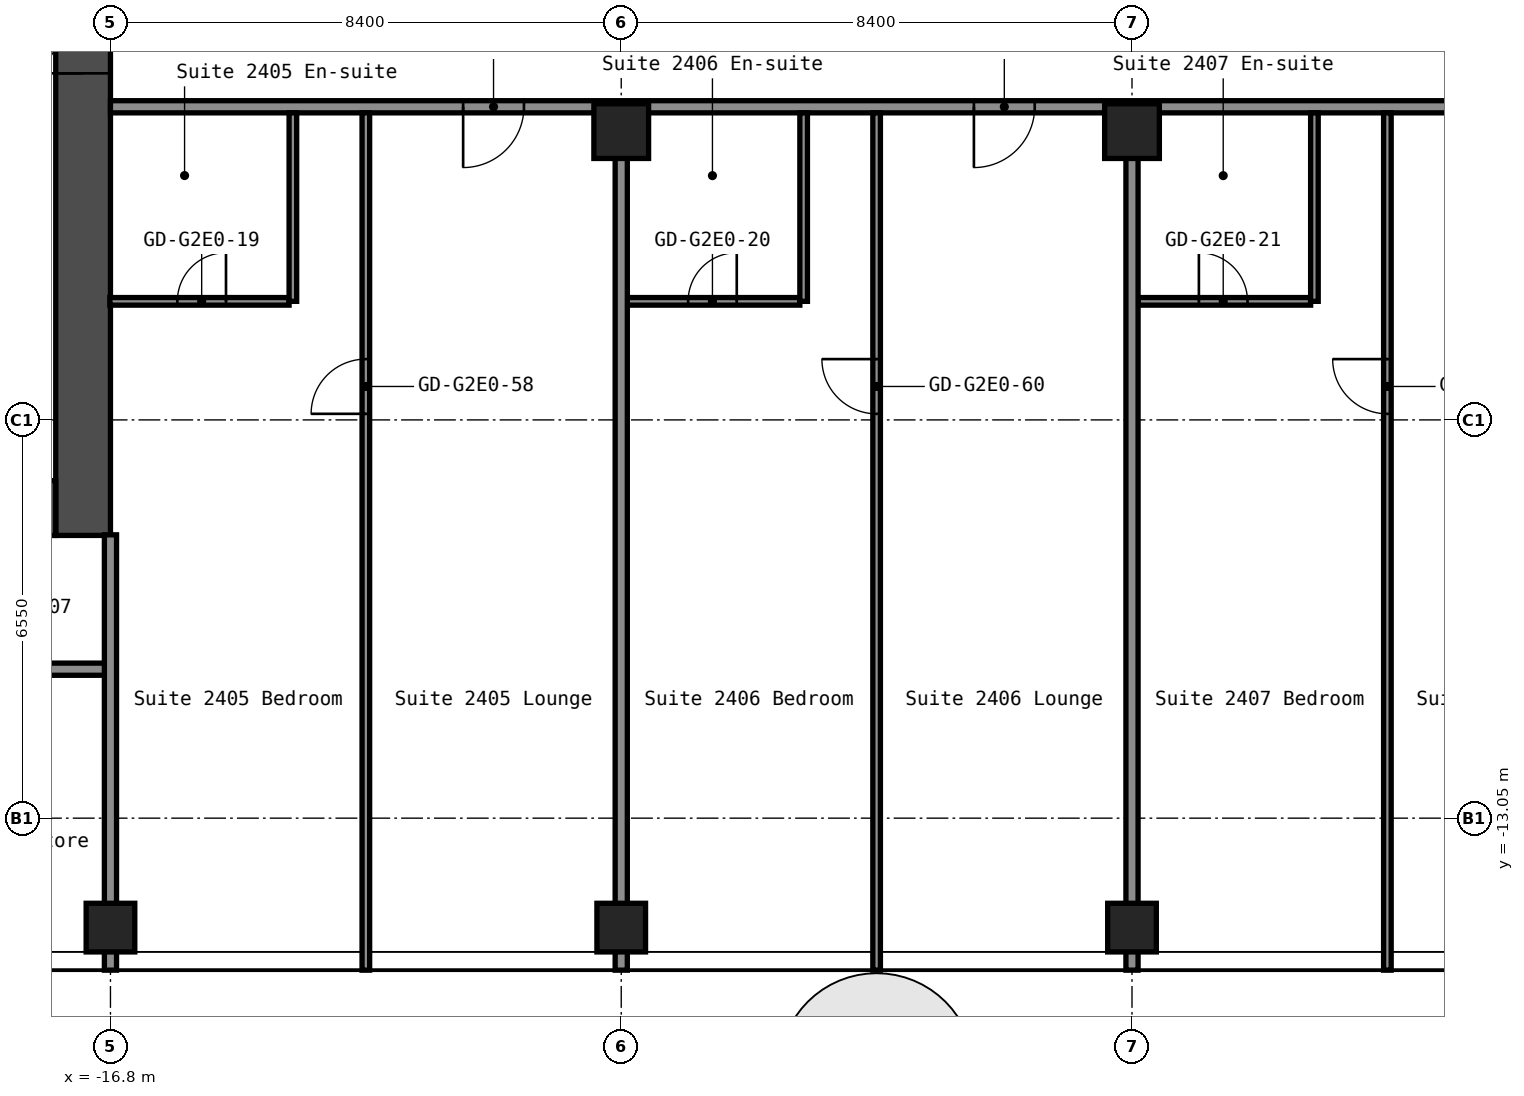
"""IFC4 building model, lengths in metres.
Left out: names, types, materials, properties, quantities, classifications, styles, units other than length and angle.
Written with IfcOpenShell. Run it as: python <this file> out.ifc"""

import sys

from ifc_helpers import new_model, si_unit, direction, frame, frame_2d, origin, origin_2d, place, context, subcontext, project, spatial, rectangle, hollow_rectangle, extrude, element, fill, save


model = new_model("IFC4")
c1 = context("Model", 3, precision=1e-05, world=origin(), true_north=direction((0.0, 1.0)))
c2 = subcontext(c1, "Body", "Model", "MODEL_VIEW")
j1 = project(units=[si_unit("LENGTHUNIT", "METRE"), si_unit("PLANEANGLEUNIT", "RADIAN")], contexts=[c1])
p1 = place(None, origin())
s1 = spatial("IfcSite", under=j1, at=p1, CompositionType="ELEMENT")
p2 = place(p1, origin())
s2 = spatial("IfcBuilding", under=s1, at=p2, CompositionType="ELEMENT")
p3 = place(p2, frame((0.0, 0.0, 88.2)))
s3 = spatial("IfcBuildingStorey", under=s2, at=p3, CompositionType="ELEMENT", Elevation=88.2)
for number, where, z_axis, x_axis in (
    (1, (-16.8, -14.85, 0.0), (0.0, 0.0, 1.0), (1.0, 0.0, 0.0)),
    (2, (-8.4, -14.85, 0.0), (0.0, 0.0, 1.0), (1.0, 0.0, 0.0)),
):
    element("IfcColumn", number, at=place(p3, frame(where, z_axis=z_axis, x_axis=x_axis)), inside=s3, PredefinedType="COLUMN", context=c2, shape_type="SweptSolid", body=[
        extrude(hollow_rectangle(XDim=0.8, YDim=0.8, WallThickness=0.032, at=origin_2d()), origin(), (0.0, 0.0, 1.0), 2.8),
    ])
p4 = place(p3, frame((-8.4, -1.75, 0.0), z_axis=(0.0, 0.0, 1.0), x_axis=(1.0, 0.0, 0.0)))
e3 = element("IfcColumn", 3, at=p4, inside=s3, PredefinedType="COLUMN", context=c2, shape_type="SweptSolid", body=[
    extrude(hollow_rectangle(XDim=0.9, YDim=0.9, WallThickness=0.036, at=origin_2d()), origin(), (0.0, 0.0, 1.0), 2.8),
])
p5 = place(p3, frame((0.0, -14.85, 0.0), z_axis=(0.0, 0.0, 1.0), x_axis=(1.0, 0.0, 0.0)))
e4 = element("IfcColumn", 4, at=p5, inside=s3, PredefinedType="COLUMN", context=c2, shape_type="SweptSolid", body=[
    extrude(hollow_rectangle(XDim=0.8, YDim=0.8, WallThickness=0.032, at=origin_2d()), origin(), (0.0, 0.0, 1.0), 2.8),
])
p6 = place(p3, frame((0.0, -1.75, 0.0), z_axis=(0.0, 0.0, 1.0), x_axis=(1.0, 0.0, 0.0)))
e5 = element("IfcColumn", 5, at=p6, inside=s3, PredefinedType="COLUMN", context=c2, shape_type="SweptSolid", body=[
    extrude(hollow_rectangle(XDim=0.9, YDim=0.9, WallThickness=0.036, at=origin_2d()), origin(), (0.0, 0.0, 1.0), 2.8),
])
p7 = place(p3, frame((-17.25, -8.4, 0.0), z_axis=(0.0, 0.0, 1.0), x_axis=(0.0, 1.0, 0.0)))
e6 = element("IfcWall", 6, at=p7, inside=s3, PredefinedType="SHEAR", context=c2, shape_type="SweptSolid", body=[
    extrude(rectangle(XDim=16.8, YDim=0.9, at=frame_2d((8.4, 0.0))), origin(), (0.0, 0.0, 1.0), 2.8),
])
p8 = place(p7, frame((7.6, 0.0, 0.0)))
e7 = element("IfcOpeningElement", 7, at=p8, cuts=e6, PredefinedType="OPENING", context=c2, shape_type="SweptSolid", body=[
    extrude(rectangle(XDim=1.2, YDim=2.1, at=frame_2d((0.6, 1.05))), frame((0.0, 0.46, 0.0), z_axis=(0.0, -1.0, 0.0), x_axis=(1.0, 0.0, 0.0)), (0.0, 0.0, 1.0), 0.92),
])
p9 = place(p3, frame((-32.7, -7.95, 0.0), z_axis=(0.0, 0.0, 1.0), x_axis=(1.0, 0.0, 0.0)))
e8 = element("IfcWall", 8, at=p9, inside=s3, PredefinedType="SHEAR", context=c2, shape_type="SweptSolid", body=[
    extrude(rectangle(XDim=15.0, YDim=0.9, at=frame_2d((7.5, 0.0))), origin(), (0.0, 0.0, 1.0), 2.8),
])
p10 = place(p9, frame((11.45, 0.0, 0.0)))
e9 = element("IfcOpeningElement", 9, at=p10, cuts=e8, PredefinedType="OPENING", context=c2, shape_type="SweptSolid", body=[
    extrude(rectangle(XDim=1.0, YDim=2.1, at=frame_2d((0.5, 1.05))), frame((0.0, 0.46, 0.0), z_axis=(0.0, -1.0, 0.0), x_axis=(1.0, 0.0, 0.0)), (0.0, 0.0, 1.0), 0.92),
])
p11 = place(p3, frame((-46.5, -10.6, 0.0), z_axis=(0.0, 0.0, 1.0), x_axis=(1.0, 0.0, 0.0)))
e10 = element("IfcWall", 10, at=p11, inside=s3, PredefinedType="PARTITIONING", context=c2, shape_type="SweptSolid", body=[
    extrude(rectangle(XDim=29.7, YDim=0.2, at=frame_2d((14.85, 0.0))), origin(), (0.0, 0.0, 1.0), 2.8),
])
p12 = place(p11, frame((1.95, 0.0, 0.0)))
e11 = element("IfcOpeningElement", 11, at=p12, cuts=e10, PredefinedType="OPENING", context=c2, shape_type="SweptSolid", body=[
    extrude(rectangle(XDim=0.9, YDim=2.1, at=frame_2d((0.45, 1.05))), frame((0.0, 0.11, 0.0), z_axis=(0.0, -1.0, 0.0), x_axis=(1.0, 0.0, 0.0)), (0.0, 0.0, 1.0), 0.22),
])
p13 = place(p11, frame((6.485, 0.0, 0.0)))
e12 = element("IfcOpeningElement", 12, at=p13, cuts=e10, PredefinedType="OPENING", context=c2, shape_type="SweptSolid", body=[
    extrude(rectangle(XDim=0.9, YDim=2.1, at=frame_2d((0.45, 1.05))), frame((0.0, 0.11, 0.0), z_axis=(0.0, -1.0, 0.0), x_axis=(1.0, 0.0, 0.0)), (0.0, 0.0, 1.0), 0.22),
])
p14 = place(p11, frame((10.685, 0.0, 0.0)))
e13 = element("IfcOpeningElement", 13, at=p14, cuts=e10, PredefinedType="OPENING", context=c2, shape_type="SweptSolid", body=[
    extrude(rectangle(XDim=0.9, YDim=2.1, at=frame_2d((0.45, 1.05))), frame((0.0, 0.11, 0.0), z_axis=(0.0, -1.0, 0.0), x_axis=(1.0, 0.0, 0.0)), (0.0, 0.0, 1.0), 0.22),
])
p15 = place(p11, frame((14.8, 0.0, 0.0)))
e14 = element("IfcOpeningElement", 14, at=p15, cuts=e10, PredefinedType="OPENING", context=c2, shape_type="SweptSolid", body=[
    extrude(rectangle(XDim=0.9, YDim=2.1, at=frame_2d((0.45, 1.05))), frame((0.0, 0.11, 0.0), z_axis=(0.0, -1.0, 0.0), x_axis=(1.0, 0.0, 0.0)), (0.0, 0.0, 1.0), 0.22),
])
p16 = place(p11, frame((19.0, 0.0, 0.0)))
e15 = element("IfcOpeningElement", 15, at=p16, cuts=e10, PredefinedType="OPENING", context=c2, shape_type="SweptSolid", body=[
    extrude(rectangle(XDim=0.9, YDim=2.1, at=frame_2d((0.45, 1.05))), frame((0.0, 0.11, 0.0), z_axis=(0.0, -1.0, 0.0), x_axis=(1.0, 0.0, 0.0)), (0.0, 0.0, 1.0), 0.22),
])
p17 = place(p11, frame((23.455, 0.0, 0.0)))
e16 = element("IfcOpeningElement", 16, at=p17, cuts=e10, PredefinedType="OPENING", context=c2, shape_type="SweptSolid", body=[
    extrude(rectangle(XDim=0.9, YDim=2.1, at=frame_2d((0.45, 1.05))), frame((0.0, 0.11, 0.0), z_axis=(0.0, -1.0, 0.0), x_axis=(1.0, 0.0, 0.0)), (0.0, 0.0, 1.0), 0.22),
])
p18 = place(p11, frame((27.655, 0.0, 0.0)))
e17 = element("IfcOpeningElement", 17, at=p18, cuts=e10, PredefinedType="OPENING", context=c2, shape_type="SweptSolid", body=[
    extrude(rectangle(XDim=0.9, YDim=2.1, at=frame_2d((0.45, 1.05))), frame((0.0, 0.11, 0.0), z_axis=(0.0, -1.0, 0.0), x_axis=(1.0, 0.0, 0.0)), (0.0, 0.0, 1.0), 0.22),
])
p19 = place(p3, frame((-16.81, -4.55, 0.0), z_axis=(0.0, 0.0, 1.0), x_axis=(1.0, 0.0, 0.0)))
e18 = element("IfcWall", 18, at=p19, inside=s3, PredefinedType="PARTITIONING", context=c2, shape_type="SweptSolid", body=[
    extrude(rectangle(XDim=2.948, YDim=0.125, at=frame_2d((1.474, 0.0))), origin(), (0.0, 0.0, 1.0), 2.8),
])
p20 = place(p19, frame((1.11, 0.0, 0.0)))
e19 = element("IfcOpeningElement", 19, at=p20, cuts=e18, PredefinedType="OPENING", context=c2, shape_type="SweptSolid", body=[
    extrude(rectangle(XDim=0.8, YDim=2.1, at=frame_2d((0.4, 1.05))), frame((0.0, 0.073, 0.0), z_axis=(0.0, -1.0, 0.0), x_axis=(1.0, 0.0, 0.0)), (0.0, 0.0, 1.0), 0.145),
])
p21 = place(p3, frame((-8.3, -4.55, 0.0), z_axis=(0.0, 0.0, 1.0), x_axis=(1.0, 0.0, 0.0)))
e20 = element("IfcWall", 20, at=p21, inside=s3, PredefinedType="PARTITIONING", context=c2, shape_type="SweptSolid", body=[
    extrude(rectangle(XDim=2.838, YDim=0.125, at=frame_2d((1.419, 0.0))), origin(), (0.0, 0.0, 1.0), 2.8),
])
p22 = place(p21, frame((1.0, 0.0, 0.0)))
e21 = element("IfcOpeningElement", 21, at=p22, cuts=e20, PredefinedType="OPENING", context=c2, shape_type="SweptSolid", body=[
    extrude(rectangle(XDim=0.8, YDim=2.1, at=frame_2d((0.4, 1.05))), frame((0.0, 0.073, 0.0), z_axis=(0.0, -1.0, 0.0), x_axis=(1.0, 0.0, 0.0)), (0.0, 0.0, 1.0), 0.145),
])
p23 = place(p3, frame((0.1, -4.55, 0.0), z_axis=(0.0, 0.0, 1.0), x_axis=(1.0, 0.0, 0.0)))
e22 = element("IfcWall", 22, at=p23, inside=s3, PredefinedType="PARTITIONING", context=c2, shape_type="SweptSolid", body=[
    extrude(rectangle(XDim=2.837, YDim=0.125, at=frame_2d((1.419, 0.0))), origin(), (0.0, 0.0, 1.0), 2.8),
])
p24 = place(p23, frame((1.0, 0.0, 0.0)))
e23 = element("IfcOpeningElement", 23, at=p24, cuts=e22, PredefinedType="OPENING", context=c2, shape_type="SweptSolid", body=[
    extrude(rectangle(XDim=0.8, YDim=2.1, at=frame_2d((0.4, 1.05))), frame((0.0, 0.073, 0.0), z_axis=(0.0, -1.0, 0.0), x_axis=(1.0, 0.0, 0.0)), (0.0, 0.0, 1.0), 0.145),
])
p25 = place(p3, frame((-16.8, -1.35, 0.0), z_axis=(0.0, 0.0, 1.0), x_axis=(1.0, 0.0, 0.0)))
e24 = element("IfcWall", 24, at=p25, inside=s3, PredefinedType="PARTITIONING", context=c2, shape_type="SweptSolid", body=[
    extrude(rectangle(XDim=33.6, YDim=0.2, at=frame_2d((16.8, 0.0))), origin(), (0.0, 0.0, 1.0), 2.8),
])
p26 = place(p25, frame((5.8, 0.0, 0.0)))
e25 = element("IfcOpeningElement", 25, at=p26, cuts=e24, PredefinedType="OPENING", context=c2, shape_type="SweptSolid", body=[
    extrude(rectangle(XDim=1.0, YDim=2.1, at=frame_2d((0.5, 1.05))), frame((0.0, 0.11, 0.0), z_axis=(0.0, -1.0, 0.0), x_axis=(1.0, 0.0, 0.0)), (0.0, 0.0, 1.0), 0.22),
])
p27 = place(p25, frame((14.2, 0.0, 0.0)))
e26 = element("IfcOpeningElement", 26, at=p27, cuts=e24, PredefinedType="OPENING", context=c2, shape_type="SweptSolid", body=[
    extrude(rectangle(XDim=1.0, YDim=2.1, at=frame_2d((0.5, 1.05))), frame((0.0, 0.11, 0.0), z_axis=(0.0, -1.0, 0.0), x_axis=(1.0, 0.0, 0.0)), (0.0, 0.0, 1.0), 0.22),
])
p28 = place(p25, frame((22.6, 0.0, 0.0)))
e27 = element("IfcOpeningElement", 27, at=p28, cuts=e24, PredefinedType="OPENING", context=c2, shape_type="SweptSolid", body=[
    extrude(rectangle(XDim=1.0, YDim=2.1, at=frame_2d((0.5, 1.05))), frame((0.0, 0.11, 0.0), z_axis=(0.0, -1.0, 0.0), x_axis=(1.0, 0.0, 0.0)), (0.0, 0.0, 1.0), 0.22),
])
p29 = place(p25, frame((26.8, 0.0, 0.0)))
e28 = element("IfcOpeningElement", 28, at=p29, cuts=e24, PredefinedType="OPENING", context=c2, shape_type="SweptSolid", body=[
    extrude(rectangle(XDim=1.0, YDim=2.1, at=frame_2d((0.5, 1.05))), frame((0.0, 0.11, 0.0), z_axis=(0.0, -1.0, 0.0), x_axis=(1.0, 0.0, 0.0)), (0.0, 0.0, 1.0), 0.22),
])
p30 = place(p3, frame((-16.8, -15.55, 0.0), z_axis=(0.0, 0.0, 1.0), x_axis=(0.0, 1.0, 0.0)))
e29 = element("IfcWall", 29, at=p30, inside=s3, PredefinedType="PARTITIONING", context=c2, shape_type="SweptSolid", body=[
    extrude(rectangle(XDim=7.16, YDim=0.2, at=frame_2d((3.58, 0.0))), origin(), (0.0, 0.0, 1.0), 2.8),
])
p31 = place(p3, frame((-13.8, -4.55, 0.0), z_axis=(0.0, 0.0, 1.0), x_axis=(0.0, 1.0, 0.0)))
e30 = element("IfcWall", 30, at=p31, inside=s3, PredefinedType="PARTITIONING", context=c2, shape_type="SweptSolid", body=[
    extrude(rectangle(XDim=3.1, YDim=0.125, at=frame_2d((1.55, 0.0))), origin(), (0.0, 0.0, 1.0), 2.8),
])
p32 = place(p3, frame((-12.6, -15.55, 0.0), z_axis=(0.0, 0.0, 1.0), x_axis=(0.0, 1.0, 0.0)))
e31 = element("IfcWall", 31, at=p32, inside=s3, PredefinedType="PARTITIONING", context=c2, shape_type="SweptSolid", body=[
    extrude(rectangle(XDim=14.1, YDim=0.125, at=frame_2d((7.05, 0.0))), origin(), (0.0, 0.0, 1.0), 2.8),
])
p33 = place(p32, frame((9.15, 0.0, 0.0)))
e32 = element("IfcOpeningElement", 32, at=p33, cuts=e31, PredefinedType="OPENING", context=c2, shape_type="SweptSolid", body=[
    extrude(rectangle(XDim=0.9, YDim=2.1, at=frame_2d((0.45, 1.05))), frame((0.0, 0.073, 0.0), z_axis=(0.0, -1.0, 0.0), x_axis=(1.0, 0.0, 0.0)), (0.0, 0.0, 1.0), 0.145),
])
p34 = place(p3, frame((-8.4, -15.55, 0.0), z_axis=(0.0, 0.0, 1.0), x_axis=(0.0, 1.0, 0.0)))
e33 = element("IfcWall", 33, at=p34, inside=s3, PredefinedType="PARTITIONING", context=c2, shape_type="SweptSolid", body=[
    extrude(rectangle(XDim=13.36, YDim=0.2, at=frame_2d((6.68, 0.0))), origin(), (0.0, 0.0, 1.0), 2.8),
])
p35 = place(p3, frame((-5.4, -4.55, 0.0), z_axis=(0.0, 0.0, 1.0), x_axis=(0.0, 1.0, 0.0)))
e34 = element("IfcWall", 34, at=p35, inside=s3, PredefinedType="PARTITIONING", context=c2, shape_type="SweptSolid", body=[
    extrude(rectangle(XDim=3.1, YDim=0.125, at=frame_2d((1.55, 0.0))), origin(), (0.0, 0.0, 1.0), 2.8),
])
p36 = place(p3, frame((-4.2, -15.55, 0.0), z_axis=(0.0, 0.0, 1.0), x_axis=(0.0, 1.0, 0.0)))
e35 = element("IfcWall", 35, at=p36, inside=s3, PredefinedType="PARTITIONING", context=c2, shape_type="SweptSolid", body=[
    extrude(rectangle(XDim=14.1, YDim=0.125, at=frame_2d((7.05, 0.0))), origin(), (0.0, 0.0, 1.0), 2.8),
])
p37 = place(p36, frame((9.15, 0.0, 0.0)))
e36 = element("IfcOpeningElement", 36, at=p37, cuts=e35, PredefinedType="OPENING", context=c2, shape_type="SweptSolid", body=[
    extrude(rectangle(XDim=0.9, YDim=2.1, at=frame_2d((0.45, 1.05))), frame((0.0, 0.073, 0.0), z_axis=(0.0, -1.0, 0.0), x_axis=(1.0, 0.0, 0.0)), (0.0, 0.0, 1.0), 0.145),
])
p38 = place(p3, frame((0.0, -15.55, 0.0), z_axis=(0.0, 0.0, 1.0), x_axis=(0.0, 1.0, 0.0)))
e37 = element("IfcWall", 37, at=p38, inside=s3, PredefinedType="PARTITIONING", context=c2, shape_type="SweptSolid", body=[
    extrude(rectangle(XDim=13.36, YDim=0.2, at=frame_2d((6.68, 0.0))), origin(), (0.0, 0.0, 1.0), 2.8),
])
p39 = place(p3, frame((3.0, -4.55, 0.0), z_axis=(0.0, 0.0, 1.0), x_axis=(0.0, 1.0, 0.0)))
e38 = element("IfcWall", 38, at=p39, inside=s3, PredefinedType="PARTITIONING", context=c2, shape_type="SweptSolid", body=[
    extrude(rectangle(XDim=3.1, YDim=0.125, at=frame_2d((1.55, 0.0))), origin(), (0.0, 0.0, 1.0), 2.8),
])
p40 = place(p3, frame((4.2, -15.55, 0.0), z_axis=(0.0, 0.0, 1.0), x_axis=(0.0, 1.0, 0.0)))
e39 = element("IfcWall", 39, at=p40, inside=s3, PredefinedType="PARTITIONING", context=c2, shape_type="SweptSolid", body=[
    extrude(rectangle(XDim=14.1, YDim=0.125, at=frame_2d((7.05, 0.0))), origin(), (0.0, 0.0, 1.0), 2.8),
])
p41 = place(p40, frame((9.15, 0.0, 0.0)))
e40 = element("IfcOpeningElement", 40, at=p41, cuts=e39, PredefinedType="OPENING", context=c2, shape_type="SweptSolid", body=[
    extrude(rectangle(XDim=0.9, YDim=2.1, at=frame_2d((0.45, 1.05))), frame((0.0, 0.073, 0.0), z_axis=(0.0, -1.0, 0.0), x_axis=(1.0, 0.0, 0.0)), (0.0, 0.0, 1.0), 0.145),
])
p42 = place(p8, origin())
e41 = element("IfcDoor", 41, at=p42, inside=s3, OperationType="DOUBLE_DOOR_SINGLE_SWING", PredefinedType="DOOR", context=c2, shape_type="SweptSolid", body=[
    extrude(rectangle(XDim=1.2, YDim=2.1, at=frame_2d((0.6, 1.05))), frame((0.0, 0.025, 0.0), z_axis=(0.0, -1.0, 0.0), x_axis=(1.0, 0.0, 0.0)), (0.0, 0.0, 1.0), 0.05),
])
fill(e7, e41)
p43 = place(p20, origin())
e42 = element("IfcDoor", 42, at=p43, inside=s3, OperationType="SINGLE_SWING_LEFT", PredefinedType="DOOR", context=c2, shape_type="SweptSolid", body=[
    extrude(rectangle(XDim=0.8, YDim=2.1, at=frame_2d((0.4, 1.05))), frame((0.0, 0.025, 0.0), z_axis=(0.0, -1.0, 0.0), x_axis=(1.0, 0.0, 0.0)), (0.0, 0.0, 1.0), 0.05),
])
fill(e19, e42)
p44 = place(p22, origin())
e43 = element("IfcDoor", 43, at=p44, inside=s3, OperationType="SINGLE_SWING_LEFT", PredefinedType="DOOR", context=c2, shape_type="SweptSolid", body=[
    extrude(rectangle(XDim=0.8, YDim=2.1, at=frame_2d((0.4, 1.05))), frame((0.0, 0.025, 0.0), z_axis=(0.0, -1.0, 0.0), x_axis=(1.0, 0.0, 0.0)), (0.0, 0.0, 1.0), 0.05),
])
fill(e21, e43)
p45 = place(p24, origin())
e44 = element("IfcDoor", 44, at=p45, inside=s3, OperationType="SINGLE_SWING_RIGHT", PredefinedType="DOOR", context=c2, shape_type="SweptSolid", body=[
    extrude(rectangle(XDim=0.8, YDim=2.1, at=frame_2d((0.4, 1.05))), frame((0.0, 0.025, 0.0), z_axis=(0.0, -1.0, 0.0), x_axis=(1.0, 0.0, 0.0)), (0.0, 0.0, 1.0), 0.05),
])
fill(e23, e44)
p46 = place(p26, origin())
e45 = element("IfcDoor", 45, at=p46, inside=s3, OperationType="SINGLE_SWING_LEFT", PredefinedType="DOOR", context=c2, shape_type="SweptSolid", body=[
    extrude(rectangle(XDim=1.0, YDim=2.1, at=frame_2d((0.5, 1.05))), frame((0.0, 0.025, 0.0), z_axis=(0.0, -1.0, 0.0), x_axis=(1.0, 0.0, 0.0)), (0.0, 0.0, 1.0), 0.05),
])
fill(e25, e45)
p47 = place(p27, origin())
e46 = element("IfcDoor", 46, at=p47, inside=s3, OperationType="SINGLE_SWING_LEFT", PredefinedType="DOOR", context=c2, shape_type="SweptSolid", body=[
    extrude(rectangle(XDim=1.0, YDim=2.1, at=frame_2d((0.5, 1.05))), frame((0.0, 0.025, 0.0), z_axis=(0.0, -1.0, 0.0), x_axis=(1.0, 0.0, 0.0)), (0.0, 0.0, 1.0), 0.05),
])
fill(e26, e46)
p48 = place(p33, origin())
e47 = element("IfcDoor", 47, at=p48, inside=s3, OperationType="SINGLE_SWING_RIGHT", PredefinedType="DOOR", context=c2, shape_type="SweptSolid", body=[
    extrude(rectangle(XDim=0.9, YDim=2.1, at=frame_2d((0.45, 1.05))), frame((0.0, 0.025, 0.0), z_axis=(0.0, -1.0, 0.0), x_axis=(1.0, 0.0, 0.0)), (0.0, 0.0, 1.0), 0.05),
])
fill(e32, e47)
p49 = place(p37, origin())
e48 = element("IfcDoor", 48, at=p49, inside=s3, OperationType="SINGLE_SWING_LEFT", PredefinedType="DOOR", context=c2, shape_type="SweptSolid", body=[
    extrude(rectangle(XDim=0.9, YDim=2.1, at=frame_2d((0.45, 1.05))), frame((0.0, 0.025, 0.0), z_axis=(0.0, -1.0, 0.0), x_axis=(1.0, 0.0, 0.0)), (0.0, 0.0, 1.0), 0.05),
])
fill(e36, e48)
p50 = place(p41, origin())
e49 = element("IfcDoor", 49, at=p50, inside=s3, OperationType="SINGLE_SWING_LEFT", PredefinedType="DOOR", context=c2, shape_type="SweptSolid", body=[
    extrude(rectangle(XDim=0.9, YDim=2.1, at=frame_2d((0.45, 1.05))), frame((0.0, 0.025, 0.0), z_axis=(0.0, -1.0, 0.0), x_axis=(1.0, 0.0, 0.0)), (0.0, 0.0, 1.0), 0.05),
])
fill(e40, e49)
save(model, sys.argv[1])
